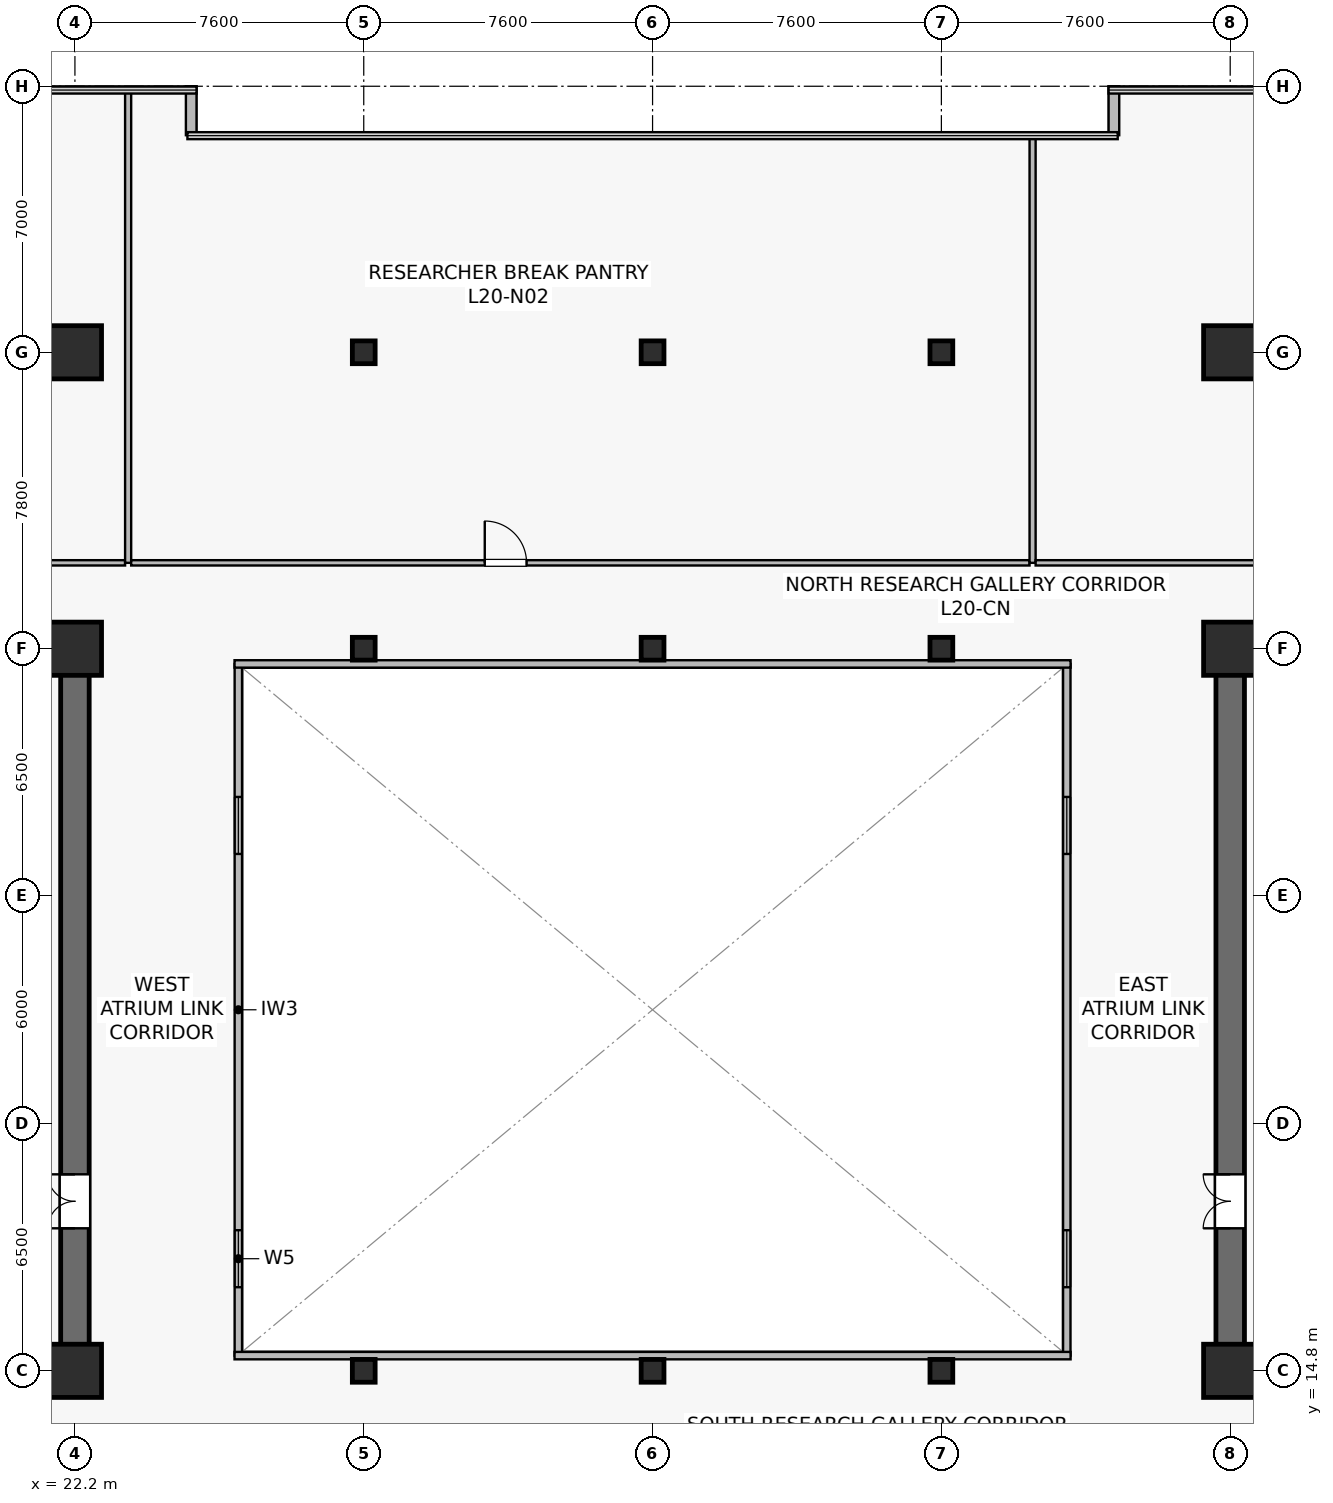
"""IFC4 building model, lengths in metres.
Left out: names, types, materials, properties, quantities, classifications, styles, units other than length and angle.
Written with IfcOpenShell. Run it as: python <this file> out.ifc"""

import sys

from ifc_helpers import new_model, si_unit, direction, frame, frame_2d, origin, origin_2d, place, context, subcontext, project, spatial, rectangle, hollow_rectangle, extrude, source, transform, mapped, element, fill, save


model = new_model("IFC4")
c1 = context("Model", 3, precision=1e-05, world=origin(), true_north=direction((0.0, 1.0)))
c2 = subcontext(c1, "Body", "Model", "MODEL_VIEW")
j1 = project(units=[si_unit("LENGTHUNIT", "METRE"), si_unit("PLANEANGLEUNIT", "RADIAN")], contexts=[c1])
p1 = place(None, origin())
s1 = spatial("IfcSite", under=j1, at=p1, CompositionType="ELEMENT")
p2 = place(p1, origin())
s2 = spatial("IfcBuilding", under=s1, at=p2, CompositionType="ELEMENT")
p3 = place(p2, frame((0.0, 0.0, 82.6)))
s3 = spatial("IfcBuildingStorey", under=s2, at=p3, CompositionType="ELEMENT", Elevation=82.6)
p4 = place(p3, frame((7.025, 14.8, 0.0), z_axis=(0.0, 0.0, 1.0), x_axis=(1.0, 0.0, 0.0)))
e1 = element("IfcWall", 1, at=p4, inside=s3, PredefinedType="SHEAR", context=c2, shape_type="SweptSolid", body=[
    extrude(rectangle(XDim=15.55, YDim=0.75, at=frame_2d((7.775, 0.0))), origin(), (0.0, 0.0, 1.0), 3.78),
])
p5 = place(p3, frame((7.025, 33.8, 0.0), z_axis=(0.0, 0.0, 1.0), x_axis=(1.0, 0.0, 0.0)))
e2 = element("IfcWall", 2, at=p5, inside=s3, PredefinedType="SHEAR", context=c2, shape_type="SweptSolid", body=[
    extrude(rectangle(XDim=15.55, YDim=0.75, at=frame_2d((7.775, 0.0))), origin(), (0.0, 0.0, 1.0), 3.78),
])
p6 = place(p5, frame((5.3, 0.0, 0.0)))
e3 = element("IfcOpeningElement", 3, at=p6, cuts=e2, PredefinedType="OPENING", context=c2, shape_type="SweptSolid", body=[
    extrude(rectangle(XDim=0.95, YDim=2.15, at=frame_2d((0.475, 1.075))), frame((0.0, 0.385, 0.0), z_axis=(0.0, -1.0, 0.0), x_axis=(1.0, 0.0, 0.0)), (0.0, 0.0, 1.0), 0.77),
])
p7 = place(p5, frame((7.815, 0.0, 0.0)))
e4 = element("IfcOpeningElement", 4, at=p7, cuts=e2, PredefinedType="OPENING", context=c2, shape_type="SweptSolid", body=[
    extrude(rectangle(XDim=0.95, YDim=2.15, at=frame_2d((0.475, 1.075))), frame((0.0, 0.385, 0.0), z_axis=(0.0, -1.0, 0.0), x_axis=(1.0, 0.0, 0.0)), (0.0, 0.0, 1.0), 0.77),
])
p8 = place(p5, frame((10.365, 0.0, 0.0)))
e5 = element("IfcOpeningElement", 5, at=p8, cuts=e2, PredefinedType="OPENING", context=c2, shape_type="SweptSolid", body=[
    extrude(rectangle(XDim=0.95, YDim=2.15, at=frame_2d((0.475, 1.075))), frame((0.0, 0.385, 0.0), z_axis=(0.0, -1.0, 0.0), x_axis=(1.0, 0.0, 0.0)), (0.0, 0.0, 1.0), 0.77),
])
p9 = place(p5, frame((12.915, 0.0, 0.0)))
e6 = element("IfcOpeningElement", 6, at=p9, cuts=e2, PredefinedType="OPENING", context=c2, shape_type="SweptSolid", body=[
    extrude(rectangle(XDim=0.95, YDim=2.15, at=frame_2d((0.475, 1.075))), frame((0.0, 0.385, 0.0), z_axis=(0.0, -1.0, 0.0), x_axis=(1.0, 0.0, 0.0)), (0.0, 0.0, 1.0), 0.77),
])
p10 = place(p3, frame((22.2, 15.175, 0.0), z_axis=(0.0, 0.0, 1.0), x_axis=(0.0, 1.0, 0.0)))
e7 = element("IfcWall", 7, at=p10, inside=s3, PredefinedType="SHEAR", context=c2, shape_type="SweptSolid", body=[
    extrude(rectangle(XDim=18.25, YDim=0.75, at=frame_2d((9.125, 0.0))), origin(), (0.0, 0.0, 1.0), 3.78),
])
p11 = place(p10, frame((3.375, 0.0, 0.0)))
e8 = element("IfcOpeningElement", 8, at=p11, cuts=e7, PredefinedType="OPENING", context=c2, shape_type="SweptSolid", body=[
    extrude(rectangle(XDim=1.42, YDim=2.2, at=frame_2d((0.71, 1.1))), frame((0.0, 0.385, 0.0), z_axis=(0.0, -1.0, 0.0), x_axis=(1.0, 0.0, 0.0)), (0.0, 0.0, 1.0), 0.77),
])
p12 = place(p3, frame((52.225, 14.8, 0.0), z_axis=(0.0, 0.0, 1.0), x_axis=(1.0, 0.0, 0.0)))
e9 = element("IfcWall", 9, at=p12, inside=s3, PredefinedType="SHEAR", context=c2, shape_type="SweptSolid", body=[
    extrude(rectangle(XDim=15.55, YDim=0.75, at=frame_2d((7.775, 0.0))), origin(), (0.0, 0.0, 1.0), 3.78),
])
p13 = place(p3, frame((52.225, 33.8, 0.0), z_axis=(0.0, 0.0, 1.0), x_axis=(1.0, 0.0, 0.0)))
e10 = element("IfcWall", 10, at=p13, inside=s3, PredefinedType="SHEAR", context=c2, shape_type="SweptSolid", body=[
    extrude(rectangle(XDim=15.55, YDim=0.75, at=frame_2d((7.775, 0.0))), origin(), (0.0, 0.0, 1.0), 3.78),
])
p14 = place(p13, frame((9.3, 0.0, 0.0)))
e11 = element("IfcOpeningElement", 11, at=p14, cuts=e10, PredefinedType="OPENING", context=c2, shape_type="SweptSolid", body=[
    extrude(rectangle(XDim=0.95, YDim=2.15, at=frame_2d((0.475, 1.075))), frame((0.0, 0.385, 0.0), z_axis=(0.0, -1.0, 0.0), x_axis=(1.0, 0.0, 0.0)), (0.0, 0.0, 1.0), 0.77),
])
p15 = place(p13, frame((6.785, 0.0, 0.0)))
e12 = element("IfcOpeningElement", 12, at=p15, cuts=e10, PredefinedType="OPENING", context=c2, shape_type="SweptSolid", body=[
    extrude(rectangle(XDim=0.95, YDim=2.15, at=frame_2d((0.475, 1.075))), frame((0.0, 0.385, 0.0), z_axis=(0.0, -1.0, 0.0), x_axis=(1.0, 0.0, 0.0)), (0.0, 0.0, 1.0), 0.77),
])
p16 = place(p13, frame((4.235, 0.0, 0.0)))
e13 = element("IfcOpeningElement", 13, at=p16, cuts=e10, PredefinedType="OPENING", context=c2, shape_type="SweptSolid", body=[
    extrude(rectangle(XDim=0.95, YDim=2.15, at=frame_2d((0.475, 1.075))), frame((0.0, 0.385, 0.0), z_axis=(0.0, -1.0, 0.0), x_axis=(1.0, 0.0, 0.0)), (0.0, 0.0, 1.0), 0.77),
])
p17 = place(p13, frame((1.685, 0.0, 0.0)))
e14 = element("IfcOpeningElement", 14, at=p17, cuts=e10, PredefinedType="OPENING", context=c2, shape_type="SweptSolid", body=[
    extrude(rectangle(XDim=0.95, YDim=2.15, at=frame_2d((0.475, 1.075))), frame((0.0, 0.385, 0.0), z_axis=(0.0, -1.0, 0.0), x_axis=(1.0, 0.0, 0.0)), (0.0, 0.0, 1.0), 0.77),
])
p18 = place(p3, frame((52.6, 15.175, 0.0), z_axis=(0.0, 0.0, 1.0), x_axis=(0.0, 1.0, 0.0)))
e15 = element("IfcWall", 15, at=p18, inside=s3, PredefinedType="SHEAR", context=c2, shape_type="SweptSolid", body=[
    extrude(rectangle(XDim=18.25, YDim=0.75, at=frame_2d((9.125, 0.0))), origin(), (0.0, 0.0, 1.0), 3.78),
])
p19 = place(p18, frame((3.375, 0.0, 0.0)))
e16 = element("IfcOpeningElement", 16, at=p19, cuts=e15, PredefinedType="OPENING", context=c2, shape_type="SweptSolid", body=[
    extrude(rectangle(XDim=1.42, YDim=2.2, at=frame_2d((0.71, 1.1))), frame((0.0, 0.385, 0.0), z_axis=(0.0, -1.0, 0.0), x_axis=(1.0, 0.0, 0.0)), (0.0, 0.0, 1.0), 0.77),
])
m1 = source(origin(), c2, "Body", "SweptSolid", [
    extrude(rectangle(XDim=1.4, YDim=1.4, at=origin_2d()), origin(), (0.0, 0.0, 1.0), 4.1),
])
for number, where, z_axis, x_axis in (
    (17, (22.2, 14.8, 0.0), (0.0, 0.0, 1.0), (1.0, 0.0, 0.0)),
    (18, (22.2, 33.8, 0.0), (0.0, 0.0, 1.0), (1.0, 0.0, 0.0)),
    (19, (22.2, 41.6, 0.0), (0.0, 0.0, 1.0), (1.0, 0.0, 0.0)),
    (20, (52.6, 14.8, 0.0), (0.0, 0.0, 1.0), (1.0, 0.0, 0.0)),
    (21, (52.6, 33.8, 0.0), (0.0, 0.0, 1.0), (1.0, 0.0, 0.0)),
    (22, (52.6, 41.6, 0.0), (0.0, 0.0, 1.0), (1.0, 0.0, 0.0)),
):
    element("IfcColumn", number, at=place(p3, frame(where, z_axis=z_axis, x_axis=x_axis)), inside=s3, PredefinedType="COLUMN", context=c2, shape_type="MappedRepresentation", body=[
        mapped(m1, transform((0.0, 0.0, 0.0), scale=1.0)),
    ])
m2 = source(origin(), c2, "Body", "SweptSolid", [
    extrude(hollow_rectangle(XDim=0.6, YDim=0.6, WallThickness=0.028, at=origin_2d()), origin(), (0.0, 0.0, 1.0), 4.1),
])
for number, where, z_axis, x_axis in (
    (23, (29.8, 14.8, 0.0), (0.0, 0.0, 1.0), (1.0, 0.0, 0.0)),
    (24, (29.8, 33.8, 0.0), (0.0, 0.0, 1.0), (1.0, 0.0, 0.0)),
    (25, (29.8, 41.6, 0.0), (0.0, 0.0, 1.0), (1.0, 0.0, 0.0)),
    (26, (37.4, 14.8, 0.0), (0.0, 0.0, 1.0), (1.0, 0.0, 0.0)),
    (27, (37.4, 33.8, 0.0), (0.0, 0.0, 1.0), (1.0, 0.0, 0.0)),
    (28, (37.4, 41.6, 0.0), (0.0, 0.0, 1.0), (1.0, 0.0, 0.0)),
    (29, (45.0, 14.8, 0.0), (0.0, 0.0, 1.0), (1.0, 0.0, 0.0)),
    (30, (45.0, 33.8, 0.0), (0.0, 0.0, 1.0), (1.0, 0.0, 0.0)),
    (31, (45.0, 41.6, 0.0), (0.0, 0.0, 1.0), (1.0, 0.0, 0.0)),
):
    element("IfcColumn", number, at=place(p3, frame(where, z_axis=z_axis, x_axis=x_axis)), inside=s3, PredefinedType="COLUMN", context=c2, shape_type="MappedRepresentation", body=[
        mapped(m2, transform((0.0, 0.0, 0.0), scale=1.0)),
    ])
for number, where, z_axis, x_axis in (
    (32, (49.54, 48.6, 0.0), (0.0, 0.0, 1.0), (0.0, -1.0, 0.0)),
    (33, (25.26, 47.312, 0.0), (0.0, 0.0, 1.0), (0.0, 1.0, 0.0)),
):
    element("IfcWall", number, at=place(p3, frame(where, z_axis=z_axis, x_axis=x_axis)), inside=s3, PredefinedType="STANDARD", context=c2, shape_type="SweptSolid", body=[
        extrude(rectangle(XDim=1.288, YDim=0.28, at=frame_2d((0.644, 0.0))), origin(), (0.0, 0.0, 1.0), 3.78),
    ])
p20 = place(p3, frame((26.5, 15.2, 0.0), z_axis=(0.0, 0.0, 1.0), x_axis=(0.0, 1.0, 0.0)))
e34 = element("IfcWall", 34, at=p20, inside=s3, PredefinedType="SOLIDWALL", context=c2, shape_type="SweptSolid", body=[
    extrude(rectangle(XDim=18.2, YDim=0.195, at=frame_2d((9.1, 0.0))), origin(), (0.0, 0.0, 1.0), 3.78),
])
p21 = place(p20, frame((1.8, 0.0, 0.9)))
e35 = element("IfcOpeningElement", 35, at=p21, cuts=e34, PredefinedType="OPENING", context=c2, shape_type="SweptSolid", body=[
    extrude(rectangle(XDim=1.5, YDim=1.4, at=frame_2d((0.75, 0.7))), frame((0.0, 0.107, 0.0), z_axis=(0.0, -1.0, 0.0), x_axis=(1.0, 0.0, 0.0)), (0.0, 0.0, 1.0), 0.215),
])
p22 = place(p20, frame((13.2, 0.0, 0.9)))
e36 = element("IfcOpeningElement", 36, at=p22, cuts=e34, PredefinedType="OPENING", context=c2, shape_type="SweptSolid", body=[
    extrude(rectangle(XDim=1.5, YDim=1.4, at=frame_2d((0.75, 0.7))), frame((0.0, 0.107, 0.0), z_axis=(0.0, -1.0, 0.0), x_axis=(1.0, 0.0, 0.0)), (0.0, 0.0, 1.0), 0.215),
])
p23 = place(p3, frame((48.3, 15.2, 0.0), z_axis=(0.0, 0.0, 1.0), x_axis=(0.0, 1.0, 0.0)))
e37 = element("IfcWall", 37, at=p23, inside=s3, PredefinedType="SOLIDWALL", context=c2, shape_type="SweptSolid", body=[
    extrude(rectangle(XDim=18.2, YDim=0.195, at=frame_2d((9.1, 0.0))), origin(), (0.0, 0.0, 1.0), 3.78),
])
p24 = place(p23, frame((1.8, 0.0, 0.9)))
e38 = element("IfcOpeningElement", 38, at=p24, cuts=e37, PredefinedType="OPENING", context=c2, shape_type="SweptSolid", body=[
    extrude(rectangle(XDim=1.5, YDim=1.4, at=frame_2d((0.75, 0.7))), frame((0.0, 0.107, 0.0), z_axis=(0.0, -1.0, 0.0), x_axis=(1.0, 0.0, 0.0)), (0.0, 0.0, 1.0), 0.215),
])
p25 = place(p23, frame((13.2, 0.0, 0.9)))
e39 = element("IfcOpeningElement", 39, at=p25, cuts=e37, PredefinedType="OPENING", context=c2, shape_type="SweptSolid", body=[
    extrude(rectangle(XDim=1.5, YDim=1.4, at=frame_2d((0.75, 0.7))), frame((0.0, 0.107, 0.0), z_axis=(0.0, -1.0, 0.0), x_axis=(1.0, 0.0, 0.0)), (0.0, 0.0, 1.0), 0.215),
])
for number, where, z_axis, x_axis in (
    (40, (26.4, 15.2, 0.0), (0.0, 0.0, 1.0), (1.0, 0.0, 0.0)),
    (41, (26.4, 33.4, 0.0), (0.0, 0.0, 1.0), (1.0, 0.0, 0.0)),
):
    element("IfcWall", number, at=place(p3, frame(where, z_axis=z_axis, x_axis=x_axis)), inside=s3, PredefinedType="SOLIDWALL", context=c2, shape_type="SweptSolid", body=[
        extrude(rectangle(XDim=22.0, YDim=0.195, at=frame_2d((11.0, 0.0))), origin(), (0.0, 0.0, 1.0), 3.78),
    ])
p26 = place(p3, frame((6.98, 36.06, 0.0), z_axis=(0.0, 0.0, 1.0), x_axis=(1.0, 0.0, 0.0)))
e42 = element("IfcWall", 42, at=p26, inside=s3, PredefinedType="PARTITIONING", context=c2, shape_type="SweptSolid", body=[
    extrude(rectangle(XDim=16.54, YDim=0.14, at=frame_2d((8.27, 0.0))), origin(), (0.0, 0.0, 1.0), 3.115),
])
p27 = place(p26, frame((8.162, 0.0, 0.0)))
e43 = element("IfcOpeningElement", 43, at=p27, cuts=e42, PredefinedType="OPENING", context=c2, shape_type="SweptSolid", body=[
    extrude(rectangle(XDim=1.1, YDim=2.18, at=frame_2d((0.55, 1.09))), frame((0.0, 0.08, 0.0), z_axis=(0.0, -1.0, 0.0), x_axis=(1.0, 0.0, 0.0)), (0.0, 0.0, 1.0), 0.16),
])
p28 = place(p3, frame((23.6, 36.06, 0.0), z_axis=(0.0, 0.0, 1.0), x_axis=(0.0, 1.0, 0.0)))
e44 = element("IfcWall", 44, at=p28, inside=s3, PredefinedType="PARTITIONING", context=c2, shape_type="SweptSolid", body=[
    extrude(rectangle(XDim=12.43, YDim=0.16, at=frame_2d((6.215, 0.0))), origin(), (0.0, 0.0, 1.0), 3.015),
])
p29 = place(p3, frame((23.68, 36.06, 0.0), z_axis=(0.0, 0.0, 1.0), x_axis=(1.0, 0.0, 0.0)))
e45 = element("IfcWall", 45, at=p29, inside=s3, PredefinedType="PARTITIONING", context=c2, shape_type="SweptSolid", body=[
    extrude(rectangle(XDim=23.64, YDim=0.14, at=frame_2d((11.82, 0.0))), origin(), (0.0, 0.0, 1.0), 3.115),
])
p30 = place(p29, frame((9.304, 0.0, 0.0)))
e46 = element("IfcOpeningElement", 46, at=p30, cuts=e45, PredefinedType="OPENING", context=c2, shape_type="SweptSolid", body=[
    extrude(rectangle(XDim=1.1, YDim=2.18, at=frame_2d((0.55, 1.09))), frame((0.0, 0.08, 0.0), z_axis=(0.0, -1.0, 0.0), x_axis=(1.0, 0.0, 0.0)), (0.0, 0.0, 1.0), 0.16),
])
p31 = place(p3, frame((47.4, 36.06, 0.0), z_axis=(0.0, 0.0, 1.0), x_axis=(0.0, 1.0, 0.0)))
e47 = element("IfcWall", 47, at=p31, inside=s3, PredefinedType="PARTITIONING", context=c2, shape_type="SweptSolid", body=[
    extrude(rectangle(XDim=11.23, YDim=0.16, at=frame_2d((5.615, 0.0))), origin(), (0.0, 0.0, 1.0), 3.015),
])
p32 = place(p3, frame((47.48, 36.06, 0.0), z_axis=(0.0, 0.0, 1.0), x_axis=(1.0, 0.0, 0.0)))
e48 = element("IfcWall", 48, at=p32, inside=s3, PredefinedType="PARTITIONING", context=c2, shape_type="SweptSolid", body=[
    extrude(rectangle(XDim=20.34, YDim=0.14, at=frame_2d((10.17, 0.0))), origin(), (0.0, 0.0, 1.0), 3.115),
])
p33 = place(p32, frame((10.176, 0.0, 0.0)))
e49 = element("IfcOpeningElement", 49, at=p33, cuts=e48, PredefinedType="OPENING", context=c2, shape_type="SweptSolid", body=[
    extrude(rectangle(XDim=1.1, YDim=2.18, at=frame_2d((0.55, 1.09))), frame((0.0, 0.08, 0.0), z_axis=(0.0, -1.0, 0.0), x_axis=(1.0, 0.0, 0.0)), (0.0, 0.0, 1.0), 0.16),
])
m3 = source(origin(), c2, "Body", "SweptSolid", [
    extrude(rectangle(XDim=1.5, YDim=1.4, at=frame_2d((0.75, 0.7))), frame((0.0, 0.03, 0.0), z_axis=(0.0, -1.0, 0.0), x_axis=(1.0, 0.0, 0.0)), (0.0, 0.0, 1.0), 0.06),
])
p34 = place(p21, origin())
e50 = element("IfcWindow", 50, at=p34, inside=s3, PartitioningType="SINGLE_PANEL", PredefinedType="WINDOW", context=c2, shape_type="MappedRepresentation", body=[
    mapped(m3, transform((0.0, 0.0, 0.0), scale=1.0)),
])
fill(e35, e50)
p35 = place(p22, origin())
e51 = element("IfcWindow", 51, at=p35, inside=s3, PartitioningType="SINGLE_PANEL", PredefinedType="WINDOW", context=c2, shape_type="MappedRepresentation", body=[
    mapped(m3, transform((0.0, 0.0, 0.0), scale=1.0)),
])
fill(e36, e51)
p36 = place(p24, origin())
e52 = element("IfcWindow", 52, at=p36, inside=s3, PartitioningType="SINGLE_PANEL", PredefinedType="WINDOW", context=c2, shape_type="MappedRepresentation", body=[
    mapped(m3, transform((0.0, 0.0, 0.0), scale=1.0)),
])
fill(e38, e52)
p37 = place(p25, origin())
e53 = element("IfcWindow", 53, at=p37, inside=s3, PartitioningType="SINGLE_PANEL", PredefinedType="WINDOW", context=c2, shape_type="MappedRepresentation", body=[
    mapped(m3, transform((0.0, 0.0, 0.0), scale=1.0)),
])
fill(e39, e53)
m4 = source(origin(), c2, "Body", "SweptSolid", [
    extrude(rectangle(XDim=1.42, YDim=2.2, at=frame_2d((0.71, 1.1))), frame((0.0, 0.025, 0.0), z_axis=(0.0, -1.0, 0.0), x_axis=(1.0, 0.0, 0.0)), (0.0, 0.0, 1.0), 0.05),
])
p38 = place(p11, origin())
e54 = element("IfcDoor", 54, at=p38, inside=s3, OperationType="DOUBLE_DOOR_SINGLE_SWING", PredefinedType="DOOR", context=c2, shape_type="MappedRepresentation", body=[
    mapped(m4, transform((0.0, 0.0, 0.0), scale=1.0)),
])
fill(e8, e54)
p39 = place(p19, origin())
e55 = element("IfcDoor", 55, at=p39, inside=s3, OperationType="DOUBLE_DOOR_SINGLE_SWING", PredefinedType="DOOR", context=c2, shape_type="MappedRepresentation", body=[
    mapped(m4, transform((0.0, 0.0, 0.0), scale=1.0)),
])
fill(e16, e55)
m5 = source(origin(), c2, "Body", "SweptSolid", [
    extrude(rectangle(XDim=1.1, YDim=2.18, at=frame_2d((0.55, 1.09))), frame((0.0, 0.025, 0.0), z_axis=(0.0, -1.0, 0.0), x_axis=(1.0, 0.0, 0.0)), (0.0, 0.0, 1.0), 0.05),
])
p40 = place(p30, origin())
e56 = element("IfcDoor", 56, at=p40, inside=s3, OperationType="SINGLE_SWING_LEFT", PredefinedType="DOOR", context=c2, shape_type="MappedRepresentation", body=[
    mapped(m5, transform((0.0, 0.0, 0.0), scale=1.0)),
])
fill(e46, e56)
save(model, sys.argv[1])
